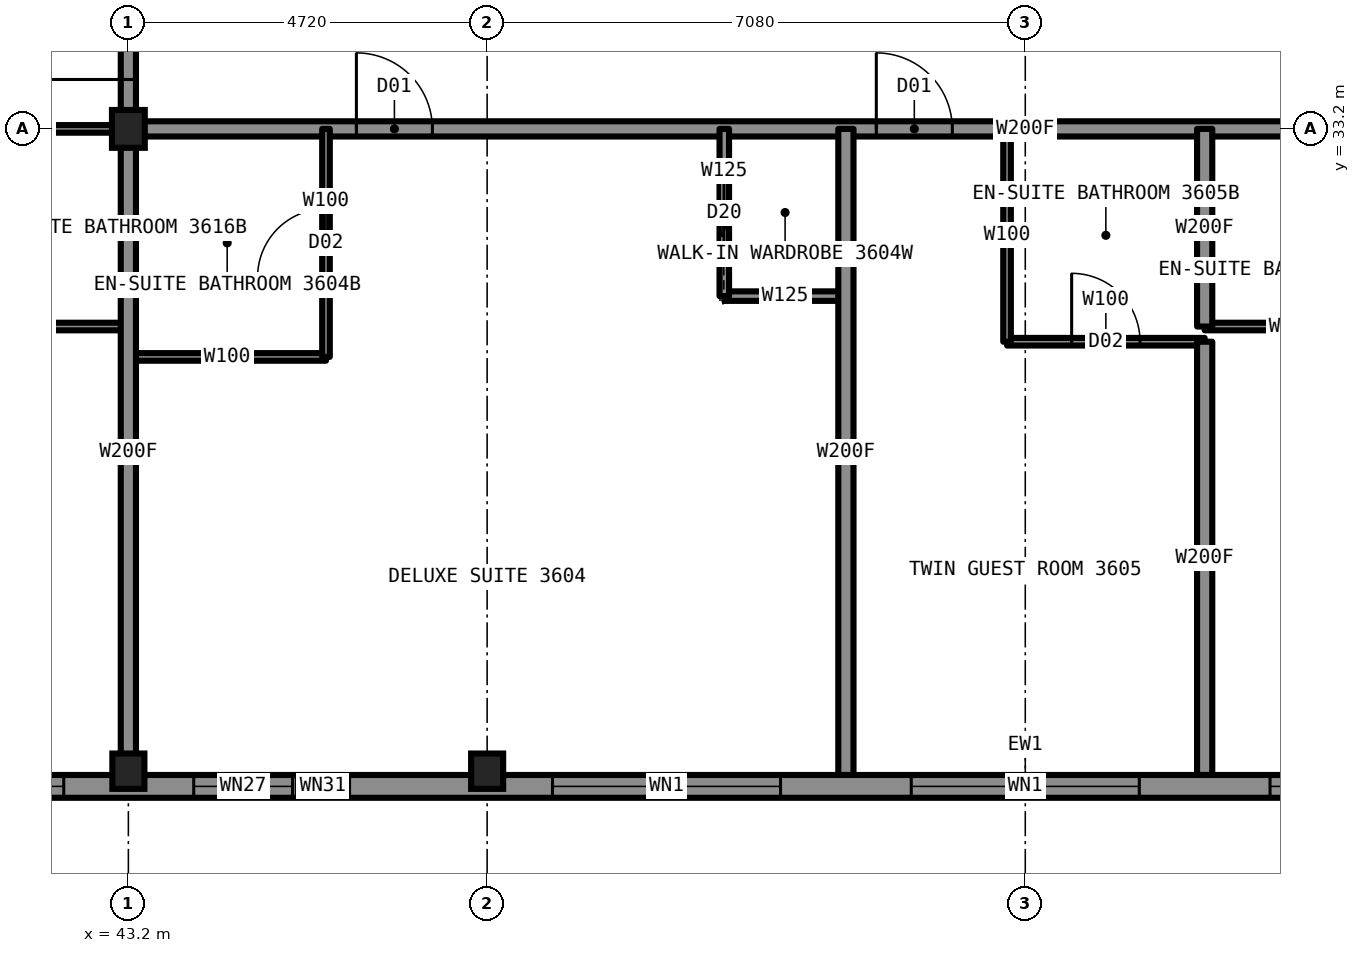
"""IFC4 building model, lengths in metres.
Left out: names, types, materials, properties, quantities, classifications, styles, units other than length and angle.
Written with IfcOpenShell. Run it as: python <this file> out.ifc"""

import sys

from ifc_helpers import new_model, si_unit, direction, frame, frame_2d, origin, origin_2d, place, context, subcontext, project, spatial, rectangle, i_section, extrude, element, fill, save


model = new_model("IFC4")
c1 = context("Model", 3, precision=1e-05, world=origin(), true_north=direction((0.0, 1.0)))
c2 = subcontext(c1, "Body", "Model", "MODEL_VIEW")
j1 = project(units=[si_unit("LENGTHUNIT", "METRE"), si_unit("PLANEANGLEUNIT", "RADIAN")], contexts=[c1])
p1 = place(None, origin())
s1 = spatial("IfcSite", under=j1, at=p1, CompositionType="ELEMENT")
p2 = place(p1, origin())
s2 = spatial("IfcBuilding", under=s1, at=p2, CompositionType="ELEMENT")
p3 = place(p2, frame((0.0, 0.0, 135.4)))
s3 = spatial("IfcBuildingStorey", under=s2, at=p3, CompositionType="ELEMENT", Elevation=135.4)
for number, where, z_axis, x_axis in (
    (1, (43.2, 24.75, 0.0), (0.0, 0.0, 1.0), (1.0, 0.0, 0.0)),
    (2, (47.92, 24.75, 0.0), (0.0, 0.0, 1.0), (1.0, 0.0, 0.0)),
):
    element("IfcColumn", number, at=place(p3, frame(where, z_axis=z_axis, x_axis=x_axis)), inside=s3, PredefinedType="COLUMN", context=c2, shape_type="SweptSolid", body=[
        extrude(i_section(OverallWidth=0.422, OverallDepth=0.465, WebThickness=0.045, FlangeThickness=0.073, at=origin_2d()), origin(), (0.0, 0.0, 1.0), 3.5),
    ])
p4 = place(p3, frame((43.2, 33.2, 0.0), z_axis=(0.0, 0.0, 1.0), x_axis=(1.0, 0.0, 0.0)))
e3 = element("IfcColumn", 3, at=p4, inside=s3, PredefinedType="COLUMN", context=c2, shape_type="SweptSolid", body=[
    extrude(i_section(OverallWidth=0.432, OverallDepth=0.498, WebThickness=0.056, FlangeThickness=0.089, at=origin_2d()), origin(), (0.0, 0.0, 1.0), 3.5),
])
p5 = place(p3, frame((40.6, 33.2, 0.0), z_axis=(0.0, 0.0, 1.0), x_axis=(1.0, 0.0, 0.0)))
e4 = element("IfcWall", 4, at=p5, inside=s3, PredefinedType="PARTITIONING", context=c2, shape_type="SweptSolid", body=[
    extrude(rectangle(XDim=2.6, YDim=0.1, at=frame_2d((1.3, 0.0))), origin(), (0.0, 0.0, 1.0), 2.573),
])
p6 = place(p3, frame((43.2, 33.2, 0.0), z_axis=(0.0, 0.0, 1.0), x_axis=(1.0, 0.0, 0.0)))
e5 = element("IfcWall", 5, at=p6, inside=s3, PredefinedType="PARTITIONING", context=c2, shape_type="SweptSolid", body=[
    extrude(rectangle(XDim=23.6, YDim=0.2, at=frame_2d((11.8, 0.0))), origin(), (0.0, 0.0, 1.0), 3.33),
])
p7 = place(p6, frame((3.0, 0.0, 0.0)))
e6 = element("IfcOpeningElement", 6, at=p7, cuts=e5, PredefinedType="OPENING", context=c2, shape_type="SweptSolid", body=[
    extrude(rectangle(XDim=1.0, YDim=2.2, at=frame_2d((0.5, 1.1))), frame((0.0, 0.11, 0.0), z_axis=(0.0, -1.0, 0.0), x_axis=(1.0, 0.0, 0.0)), (0.0, 0.0, 1.0), 0.22),
])
p8 = place(p6, frame((9.84, 0.0, 0.0)))
e7 = element("IfcOpeningElement", 7, at=p8, cuts=e5, PredefinedType="OPENING", context=c2, shape_type="SweptSolid", body=[
    extrude(rectangle(XDim=1.0, YDim=2.2, at=frame_2d((0.5, 1.1))), frame((0.0, 0.11, 0.0), z_axis=(0.0, -1.0, 0.0), x_axis=(1.0, 0.0, 0.0)), (0.0, 0.0, 1.0), 0.22),
])
p9 = place(p6, frame((16.71, 0.0, 0.0)))
e8 = element("IfcOpeningElement", 8, at=p9, cuts=e5, PredefinedType="OPENING", context=c2, shape_type="SweptSolid", body=[
    extrude(rectangle(XDim=1.0, YDim=2.2, at=frame_2d((0.5, 1.1))), frame((0.0, 0.11, 0.0), z_axis=(0.0, -1.0, 0.0), x_axis=(1.0, 0.0, 0.0)), (0.0, 0.0, 1.0), 0.22),
])
p10 = place(p6, frame((20.34, 0.0, 0.0)))
e9 = element("IfcOpeningElement", 9, at=p10, cuts=e5, PredefinedType="OPENING", context=c2, shape_type="SweptSolid", body=[
    extrude(rectangle(XDim=1.0, YDim=2.2, at=frame_2d((0.5, 1.1))), frame((0.0, 0.11, 0.0), z_axis=(0.0, -1.0, 0.0), x_axis=(1.0, 0.0, 0.0)), (0.0, 0.0, 1.0), 0.22),
])
p11 = place(p3, frame((51.04, 31.0, 0.0), z_axis=(0.0, 0.0, 1.0), x_axis=(1.0, 0.0, 0.0)))
e10 = element("IfcWall", 10, at=p11, inside=s3, PredefinedType="PARTITIONING", context=c2, shape_type="SweptSolid", body=[
    extrude(rectangle(XDim=1.6, YDim=0.125, at=frame_2d((0.8, 0.0))), origin(), (0.0, 0.0, 1.0), 3.33),
])
p12 = place(p3, frame((40.6, 30.6, 0.0), z_axis=(0.0, 0.0, 1.0), x_axis=(1.0, 0.0, 0.0)))
e11 = element("IfcWall", 11, at=p12, inside=s3, PredefinedType="PARTITIONING", context=c2, shape_type="SweptSolid", body=[
    extrude(rectangle(XDim=2.6, YDim=0.1, at=frame_2d((1.3, 0.0))), origin(), (0.0, 0.0, 1.0), 3.33),
])
p13 = place(p3, frame((57.36, 30.6, 0.0), z_axis=(0.0, 0.0, 1.0), x_axis=(1.0, 0.0, 0.0)))
e12 = element("IfcWall", 12, at=p13, inside=s3, PredefinedType="PARTITIONING", context=c2, shape_type="SweptSolid", body=[
    extrude(rectangle(XDim=2.3, YDim=0.1, at=frame_2d((1.15, 0.0))), origin(), (0.0, 0.0, 1.0), 3.33),
])
p14 = place(p3, frame((54.76, 30.4, 0.0), z_axis=(0.0, 0.0, 1.0), x_axis=(1.0, 0.0, 0.0)))
e13 = element("IfcWall", 13, at=p14, inside=s3, PredefinedType="PARTITIONING", context=c2, shape_type="SweptSolid", body=[
    extrude(rectangle(XDim=2.6, YDim=0.1, at=frame_2d((1.3, 0.0))), origin(), (0.0, 0.0, 1.0), 3.33),
])
p15 = place(p14, frame((0.85, 0.0, 0.0)))
e14 = element("IfcOpeningElement", 14, at=p15, cuts=e13, PredefinedType="OPENING", context=c2, shape_type="SweptSolid", body=[
    extrude(rectangle(XDim=0.9, YDim=2.1, at=frame_2d((0.45, 1.05))), frame((0.0, 0.06, 0.0), z_axis=(0.0, -1.0, 0.0), x_axis=(1.0, 0.0, 0.0)), (0.0, 0.0, 1.0), 0.12),
])
p16 = place(p3, frame((43.2, 30.2, 0.0), z_axis=(0.0, 0.0, 1.0), x_axis=(1.0, 0.0, 0.0)))
e15 = element("IfcWall", 15, at=p16, inside=s3, PredefinedType="PARTITIONING", context=c2, shape_type="SweptSolid", body=[
    extrude(rectangle(XDim=2.6, YDim=0.1, at=frame_2d((1.3, 0.0))), origin(), (0.0, 0.0, 1.0), 3.33),
])
p17 = place(p3, frame((54.76, 30.4, 0.0), z_axis=(0.0, 0.0, 1.0), x_axis=(0.0, 1.0, 0.0)))
e16 = element("IfcWall", 16, at=p17, inside=s3, PredefinedType="PARTITIONING", context=c2, shape_type="SweptSolid", body=[
    extrude(rectangle(XDim=2.8, YDim=0.1, at=frame_2d((1.4, 0.0))), origin(), (0.0, 0.0, 1.0), 3.33),
])
p18 = place(p3, frame((43.2, 33.2, 0.0), z_axis=(0.0, 0.0, 1.0), x_axis=(0.0, 1.0, 0.0)))
e17 = element("IfcWall", 17, at=p18, inside=s3, PredefinedType="PARTITIONING", context=c2, shape_type="SweptSolid", body=[
    extrude(rectangle(XDim=23.6, YDim=0.2, at=frame_2d((11.8, 0.0))), origin(), (0.0, 0.0, 1.0), 3.33),
])
p19 = place(p18, frame((6.98, 0.0, 0.0)))
e18 = element("IfcOpeningElement", 18, at=p19, cuts=e17, PredefinedType="OPENING", context=c2, shape_type="SweptSolid", body=[
    extrude(rectangle(XDim=1.0, YDim=2.2, at=frame_2d((0.5, 1.1))), frame((0.0, 0.11, 0.0), z_axis=(0.0, -1.0, 0.0), x_axis=(1.0, 0.0, 0.0)), (0.0, 0.0, 1.0), 0.22),
])
p20 = place(p18, frame((11.7, 0.0, 0.0)))
e19 = element("IfcOpeningElement", 19, at=p20, cuts=e17, PredefinedType="OPENING", context=c2, shape_type="SweptSolid", body=[
    extrude(rectangle(XDim=1.0, YDim=2.2, at=frame_2d((0.5, 1.1))), frame((0.0, 0.11, 0.0), z_axis=(0.0, -1.0, 0.0), x_axis=(1.0, 0.0, 0.0)), (0.0, 0.0, 1.0), 0.22),
])
p21 = place(p18, frame((15.62, 0.0, 0.0)))
e20 = element("IfcOpeningElement", 20, at=p21, cuts=e17, PredefinedType="OPENING", context=c2, shape_type="SweptSolid", body=[
    extrude(rectangle(XDim=1.0, YDim=2.2, at=frame_2d((0.5, 1.1))), frame((0.0, 0.11, 0.0), z_axis=(0.0, -1.0, 0.0), x_axis=(1.0, 0.0, 0.0)), (0.0, 0.0, 1.0), 0.22),
])
p22 = place(p18, frame((21.85, 0.0, 0.0)))
e21 = element("IfcOpeningElement", 21, at=p22, cuts=e17, PredefinedType="OPENING", context=c2, shape_type="SweptSolid", body=[
    extrude(rectangle(XDim=1.1, YDim=2.2, at=frame_2d((0.55, 1.1))), frame((0.0, 0.11, 0.0), z_axis=(0.0, -1.0, 0.0), x_axis=(1.0, 0.0, 0.0)), (0.0, 0.0, 1.0), 0.22),
])
p23 = place(p18, frame((0.65, 0.0, 0.0)))
e22 = element("IfcOpeningElement", 22, at=p23, cuts=e17, PredefinedType="OPENING", context=c2, shape_type="SweptSolid", body=[
    extrude(rectangle(XDim=1.1, YDim=2.2, at=frame_2d((0.55, 1.1))), frame((0.0, 0.11, 0.0), z_axis=(0.0, -1.0, 0.0), x_axis=(1.0, 0.0, 0.0)), (0.0, 0.0, 1.0), 0.22),
])
p24 = place(p3, frame((43.2, 24.7, 0.0), z_axis=(0.0, 0.0, 1.0), x_axis=(0.0, 1.0, 0.0)))
e23 = element("IfcWall", 23, at=p24, inside=s3, PredefinedType="PARTITIONING", context=c2, shape_type="SweptSolid", body=[
    extrude(rectangle(XDim=8.5, YDim=0.2, at=frame_2d((4.25, 0.0))), origin(), (0.0, 0.0, 1.0), 2.573),
])
p25 = place(p3, frame((52.64, 24.7, 0.0), z_axis=(0.0, 0.0, 1.0), x_axis=(0.0, 1.0, 0.0)))
e24 = element("IfcWall", 24, at=p25, inside=s3, PredefinedType="PARTITIONING", context=c2, shape_type="SweptSolid", body=[
    extrude(rectangle(XDim=8.5, YDim=0.2, at=frame_2d((4.25, 0.0))), origin(), (0.0, 0.0, 1.0), 3.33),
])
p26 = place(p3, frame((51.04, 31.0, 0.0), z_axis=(0.0, 0.0, 1.0), x_axis=(0.0, 1.0, 0.0)))
e25 = element("IfcWall", 25, at=p26, inside=s3, PredefinedType="PARTITIONING", context=c2, shape_type="SweptSolid", body=[
    extrude(rectangle(XDim=2.2, YDim=0.125, at=frame_2d((1.1, 0.0))), origin(), (0.0, 0.0, 1.0), 3.33),
])
p27 = place(p26, frame((0.7, 0.0, 0.0)))
e26 = element("IfcOpeningElement", 26, at=p27, cuts=e25, PredefinedType="OPENING", context=c2, shape_type="SweptSolid", body=[
    extrude(rectangle(XDim=0.8, YDim=2.1, at=frame_2d((0.4, 1.05))), frame((0.0, 0.073, 0.0), z_axis=(0.0, -1.0, 0.0), x_axis=(1.0, 0.0, 0.0)), (0.0, 0.0, 1.0), 0.145),
])
p28 = place(p3, frame((45.8, 30.2, 0.0), z_axis=(0.0, 0.0, 1.0), x_axis=(0.0, 1.0, 0.0)))
e27 = element("IfcWall", 27, at=p28, inside=s3, PredefinedType="PARTITIONING", context=c2, shape_type="SweptSolid", body=[
    extrude(rectangle(XDim=3.0, YDim=0.1, at=frame_2d((1.5, 0.0))), origin(), (0.0, 0.0, 1.0), 3.33),
])
p29 = place(p28, frame((1.05, 0.0, 0.0)))
e28 = element("IfcOpeningElement", 28, at=p29, cuts=e27, PredefinedType="OPENING", context=c2, shape_type="SweptSolid", body=[
    extrude(rectangle(XDim=0.9, YDim=2.1, at=frame_2d((0.45, 1.05))), frame((0.0, 0.06, 0.0), z_axis=(0.0, -1.0, 0.0), x_axis=(1.0, 0.0, 0.0)), (0.0, 0.0, 1.0), 0.12),
])
p30 = place(p3, frame((57.36, 24.7, 0.0), z_axis=(0.0, 0.0, 1.0), x_axis=(0.0, 1.0, 0.0)))
e29 = element("IfcWall", 29, at=p30, inside=s3, PredefinedType="PARTITIONING", context=c2, shape_type="SweptSolid", body=[
    extrude(rectangle(XDim=5.7, YDim=0.2, at=frame_2d((2.85, 0.0))), origin(), (0.0, 0.0, 1.0), 3.33),
])
p31 = place(p3, frame((57.36, 30.6, 0.0), z_axis=(0.0, 0.0, 1.0), x_axis=(0.0, 1.0, 0.0)))
e30 = element("IfcWall", 30, at=p31, inside=s3, PredefinedType="PARTITIONING", context=c2, shape_type="SweptSolid", body=[
    extrude(rectangle(XDim=2.6, YDim=0.2, at=frame_2d((1.3, 0.0))), origin(), (0.0, 0.0, 1.0), 3.33),
])
p32 = place(p3, frame((39.9, 24.55, 0.0), z_axis=(0.0, 0.0, 1.0), x_axis=(1.0, 0.0, 0.0)))
e31 = element("IfcWall", 31, at=p32, inside=s3, PredefinedType="SOLIDWALL", context=c2, shape_type="SweptSolid", body=[
    extrude(rectangle(XDim=30.2, YDim=0.3, at=frame_2d((15.1, 0.0))), origin(), (0.0, 0.0, 1.0), 2.83),
])
p33 = place(p32, frame((0.85, 0.0, 0.5)))
e32 = element("IfcOpeningElement", 32, at=p33, cuts=e31, PredefinedType="OPENING", context=c2, shape_type="SweptSolid", body=[
    extrude(rectangle(XDim=1.6, YDim=2.0, at=frame_2d((0.8, 1.0))), frame((0.0, 0.16, 0.0), z_axis=(0.0, -1.0, 0.0), x_axis=(1.0, 0.0, 0.0)), (0.0, 0.0, 1.0), 0.32),
])
p34 = place(p32, frame((4.16, 0.0, 0.5)))
e33 = element("IfcOpeningElement", 33, at=p34, cuts=e31, PredefinedType="OPENING", context=c2, shape_type="SweptSolid", body=[
    extrude(rectangle(XDim=1.3, YDim=1.9, at=frame_2d((0.65, 0.95))), frame((0.0, 0.16, 0.0), z_axis=(0.0, -1.0, 0.0), x_axis=(1.0, 0.0, 0.0)), (0.0, 0.0, 1.0), 0.32),
])
p35 = place(p32, frame((8.88, 0.0, 0.5)))
e34 = element("IfcOpeningElement", 34, at=p35, cuts=e31, PredefinedType="OPENING", context=c2, shape_type="SweptSolid", body=[
    extrude(rectangle(XDim=3.0, YDim=2.0, at=frame_2d((1.5, 1.0))), frame((0.0, 0.16, 0.0), z_axis=(0.0, -1.0, 0.0), x_axis=(1.0, 0.0, 0.0)), (0.0, 0.0, 1.0), 0.32),
])
p36 = place(p32, frame((13.6, 0.0, 0.5)))
e35 = element("IfcOpeningElement", 35, at=p36, cuts=e31, PredefinedType="OPENING", context=c2, shape_type="SweptSolid", body=[
    extrude(rectangle(XDim=3.0, YDim=2.0, at=frame_2d((1.5, 1.0))), frame((0.0, 0.16, 0.0), z_axis=(0.0, -1.0, 0.0), x_axis=(1.0, 0.0, 0.0)), (0.0, 0.0, 1.0), 0.32),
])
p37 = place(p32, frame((18.32, 0.0, 0.5)))
e36 = element("IfcOpeningElement", 36, at=p37, cuts=e31, PredefinedType="OPENING", context=c2, shape_type="SweptSolid", body=[
    extrude(rectangle(XDim=3.0, YDim=2.0, at=frame_2d((1.5, 1.0))), frame((0.0, 0.16, 0.0), z_axis=(0.0, -1.0, 0.0), x_axis=(1.0, 0.0, 0.0)), (0.0, 0.0, 1.0), 0.32),
])
p38 = place(p32, frame((24.69, 0.0, 0.5)))
e37 = element("IfcOpeningElement", 37, at=p38, cuts=e31, PredefinedType="OPENING", context=c2, shape_type="SweptSolid", body=[
    extrude(rectangle(XDim=1.3, YDim=1.9, at=frame_2d((0.65, 0.95))), frame((0.0, 0.16, 0.0), z_axis=(0.0, -1.0, 0.0), x_axis=(1.0, 0.0, 0.0)), (0.0, 0.0, 1.0), 0.32),
])
p39 = place(p32, frame((27.75, 0.0, 0.5)))
e38 = element("IfcOpeningElement", 38, at=p39, cuts=e31, PredefinedType="OPENING", context=c2, shape_type="SweptSolid", body=[
    extrude(rectangle(XDim=1.6, YDim=2.0, at=frame_2d((0.8, 1.0))), frame((0.0, 0.16, 0.0), z_axis=(0.0, -1.0, 0.0), x_axis=(1.0, 0.0, 0.0)), (0.0, 0.0, 1.0), 0.32),
])
p40 = place(p32, frame((5.51, 0.0, 0.5)))
e39 = element("IfcOpeningElement", 39, at=p40, cuts=e31, PredefinedType="OPENING", context=c2, shape_type="SweptSolid", body=[
    extrude(rectangle(XDim=0.7, YDim=0.9, at=frame_2d((0.35, 0.45))), frame((0.0, 0.16, 0.0), z_axis=(0.0, -1.0, 0.0), x_axis=(1.0, 0.0, 0.0)), (0.0, 0.0, 1.0), 0.32),
])
p41 = place(p32, frame((23.99, 0.0, 0.5)))
e40 = element("IfcOpeningElement", 40, at=p41, cuts=e31, PredefinedType="OPENING", context=c2, shape_type="SweptSolid", body=[
    extrude(rectangle(XDim=0.7, YDim=0.9, at=frame_2d((0.35, 0.45))), frame((0.0, 0.16, 0.0), z_axis=(0.0, -1.0, 0.0), x_axis=(1.0, 0.0, 0.0)), (0.0, 0.0, 1.0), 0.32),
])
p42 = place(p7, origin())
e41 = element("IfcDoor", 41, at=p42, inside=s3, OperationType="SINGLE_SWING_LEFT", PredefinedType="DOOR", context=c2, shape_type="SweptSolid", body=[
    extrude(rectangle(XDim=1.0, YDim=2.2, at=frame_2d((0.5, 1.1))), frame((0.0, 0.025, 0.0), z_axis=(0.0, -1.0, 0.0), x_axis=(1.0, 0.0, 0.0)), (0.0, 0.0, 1.0), 0.05),
])
fill(e6, e41)
p43 = place(p29, origin())
e42 = element("IfcDoor", 42, at=p43, inside=s3, OperationType="SINGLE_SWING_RIGHT", PredefinedType="DOOR", context=c2, shape_type="SweptSolid", body=[
    extrude(rectangle(XDim=0.9, YDim=2.1, at=frame_2d((0.45, 1.05))), frame((0.0, 0.025, 0.0), z_axis=(0.0, -1.0, 0.0), x_axis=(1.0, 0.0, 0.0)), (0.0, 0.0, 1.0), 0.05),
])
fill(e28, e42)
p44 = place(p27, origin())
e43 = element("IfcDoor", 43, at=p44, inside=s3, OperationType="SLIDING_TO_LEFT", PredefinedType="DOOR", context=c2, shape_type="SweptSolid", body=[
    extrude(rectangle(XDim=0.8, YDim=2.1, at=frame_2d((0.4, 1.05))), frame((0.0, 0.025, 0.0), z_axis=(0.0, -1.0, 0.0), x_axis=(1.0, 0.0, 0.0)), (0.0, 0.0, 1.0), 0.05),
])
fill(e26, e43)
p45 = place(p8, origin())
e44 = element("IfcDoor", 44, at=p45, inside=s3, OperationType="SINGLE_SWING_LEFT", PredefinedType="DOOR", context=c2, shape_type="SweptSolid", body=[
    extrude(rectangle(XDim=1.0, YDim=2.2, at=frame_2d((0.5, 1.1))), frame((0.0, 0.025, 0.0), z_axis=(0.0, -1.0, 0.0), x_axis=(1.0, 0.0, 0.0)), (0.0, 0.0, 1.0), 0.05),
])
fill(e7, e44)
p46 = place(p15, origin())
e45 = element("IfcDoor", 45, at=p46, inside=s3, OperationType="SINGLE_SWING_RIGHT", PredefinedType="DOOR", context=c2, shape_type="SweptSolid", body=[
    extrude(rectangle(XDim=0.9, YDim=2.1, at=frame_2d((0.45, 1.05))), frame((0.0, 0.025, 0.0), z_axis=(0.0, -1.0, 0.0), x_axis=(1.0, 0.0, 0.0)), (0.0, 0.0, 1.0), 0.05),
])
fill(e14, e45)
p47 = place(p23, origin())
e46 = element("IfcDoor", 46, at=p47, inside=s3, OperationType="SINGLE_SWING_LEFT", PredefinedType="DOOR", context=c2, shape_type="SweptSolid", body=[
    extrude(rectangle(XDim=1.1, YDim=2.2, at=frame_2d((0.55, 1.1))), frame((0.0, 0.025, 0.0), z_axis=(0.0, -1.0, 0.0), x_axis=(1.0, 0.0, 0.0)), (0.0, 0.0, 1.0), 0.05),
])
fill(e22, e46)
p48 = place(p33, origin())
e47 = element("IfcWindow", 47, at=p48, inside=s3, PartitioningType="SINGLE_PANEL", PredefinedType="WINDOW", context=c2, shape_type="SweptSolid", body=[
    extrude(rectangle(XDim=1.6, YDim=2.0, at=frame_2d((0.8, 1.0))), frame((0.0, 0.03, 0.0), z_axis=(0.0, -1.0, 0.0), x_axis=(1.0, 0.0, 0.0)), (0.0, 0.0, 1.0), 0.06),
])
fill(e32, e47)
p49 = place(p34, origin())
e48 = element("IfcWindow", 48, at=p49, inside=s3, PartitioningType="SINGLE_PANEL", PredefinedType="WINDOW", context=c2, shape_type="SweptSolid", body=[
    extrude(rectangle(XDim=1.3, YDim=1.9, at=frame_2d((0.65, 0.95))), frame((0.0, 0.03, 0.0), z_axis=(0.0, -1.0, 0.0), x_axis=(1.0, 0.0, 0.0)), (0.0, 0.0, 1.0), 0.06),
])
fill(e33, e48)
p50 = place(p35, origin())
e49 = element("IfcWindow", 49, at=p50, inside=s3, PartitioningType="SINGLE_PANEL", PredefinedType="WINDOW", context=c2, shape_type="SweptSolid", body=[
    extrude(rectangle(XDim=3.0, YDim=2.0, at=frame_2d((1.5, 1.0))), frame((0.0, 0.03, 0.0), z_axis=(0.0, -1.0, 0.0), x_axis=(1.0, 0.0, 0.0)), (0.0, 0.0, 1.0), 0.06),
])
fill(e34, e49)
p51 = place(p36, origin())
e50 = element("IfcWindow", 50, at=p51, inside=s3, PartitioningType="SINGLE_PANEL", PredefinedType="WINDOW", context=c2, shape_type="SweptSolid", body=[
    extrude(rectangle(XDim=3.0, YDim=2.0, at=frame_2d((1.5, 1.0))), frame((0.0, 0.03, 0.0), z_axis=(0.0, -1.0, 0.0), x_axis=(1.0, 0.0, 0.0)), (0.0, 0.0, 1.0), 0.06),
])
fill(e35, e50)
p52 = place(p37, origin())
e51 = element("IfcWindow", 51, at=p52, inside=s3, PartitioningType="SINGLE_PANEL", PredefinedType="WINDOW", context=c2, shape_type="SweptSolid", body=[
    extrude(rectangle(XDim=3.0, YDim=2.0, at=frame_2d((1.5, 1.0))), frame((0.0, 0.03, 0.0), z_axis=(0.0, -1.0, 0.0), x_axis=(1.0, 0.0, 0.0)), (0.0, 0.0, 1.0), 0.06),
])
fill(e36, e51)
p53 = place(p40, origin())
e52 = element("IfcWindow", 52, at=p53, inside=s3, PartitioningType="SINGLE_PANEL", PredefinedType="WINDOW", context=c2, shape_type="SweptSolid", body=[
    extrude(rectangle(XDim=0.7, YDim=0.9, at=frame_2d((0.35, 0.45))), frame((0.0, 0.03, 0.0), z_axis=(0.0, -1.0, 0.0), x_axis=(1.0, 0.0, 0.0)), (0.0, 0.0, 1.0), 0.06),
])
fill(e39, e52)
save(model, sys.argv[1])
